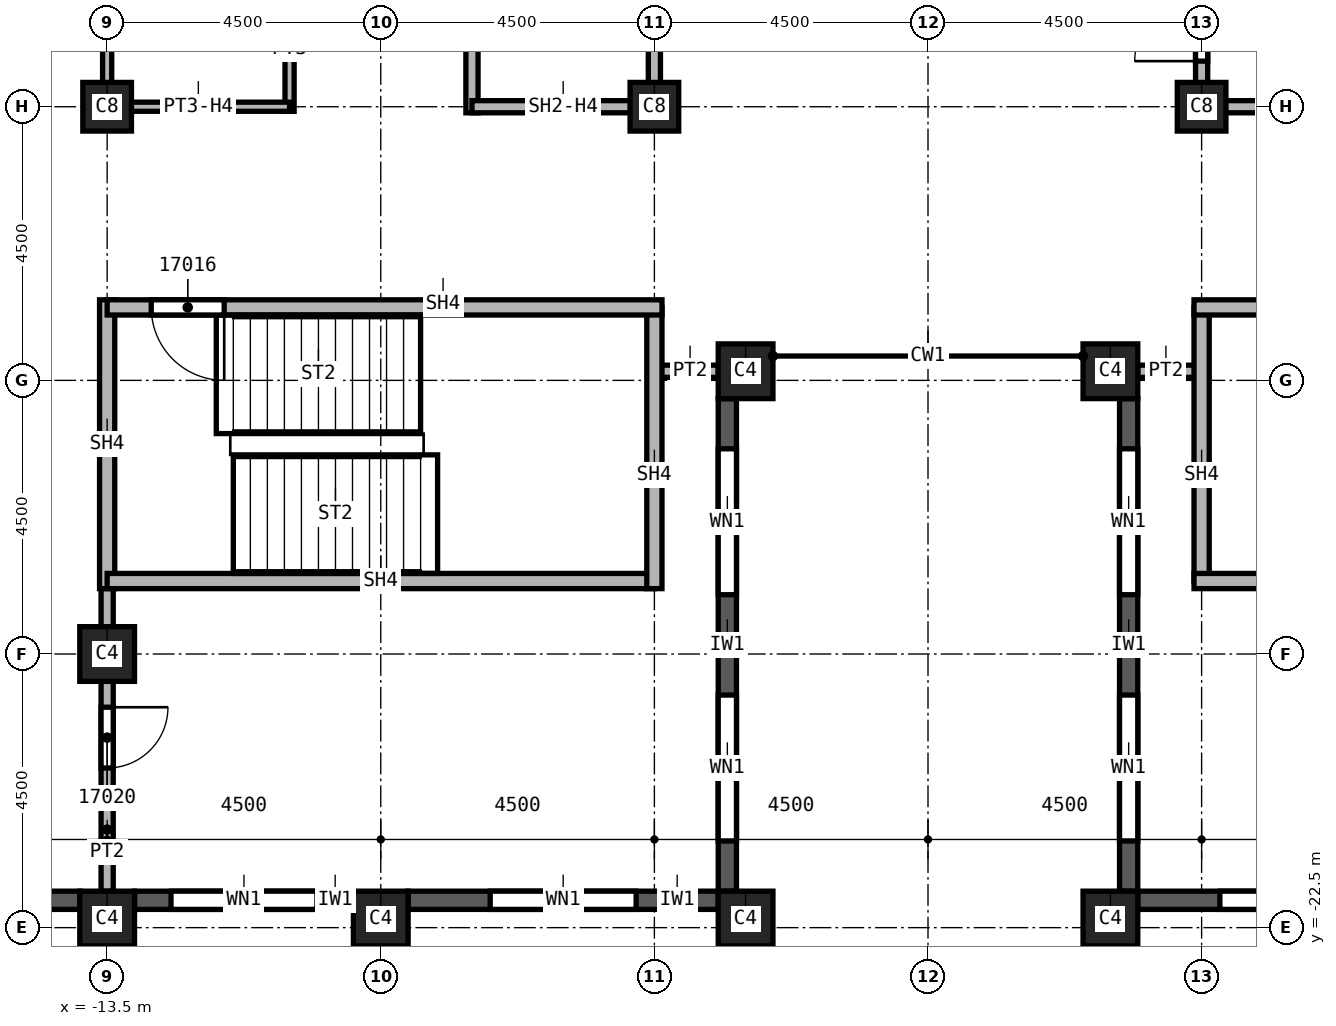
"""IFC4 building model, lengths in metres.
Left out: names, types, materials, properties, quantities, classifications, styles, units other than length and angle.
Written with IfcOpenShell. Run it as: python <this file> out.ifc"""

import sys

from ifc_helpers import new_model, si_unit, direction, frame, frame_2d, origin, origin_2d, place, context, subcontext, project, spatial, rectangle, extrude, element, fill, save


model = new_model("IFC4")
c1 = context("Model", 3, precision=1e-05, world=origin(), true_north=direction((0.0, 1.0)))
c2 = subcontext(c1, "Body", "Model", "MODEL_VIEW")
j1 = project(units=[si_unit("LENGTHUNIT", "METRE"), si_unit("PLANEANGLEUNIT", "RADIAN")], contexts=[c1])
p1 = place(None, origin())
s1 = spatial("IfcSite", under=j1, at=p1, CompositionType="ELEMENT")
p2 = place(p1, origin())
s2 = spatial("IfcBuilding", under=s1, at=p2, CompositionType="ELEMENT")
p3 = place(p2, frame((0.0, 0.0, 254.0)))
s3 = spatial("IfcBuildingStorey", under=s2, at=p3, CompositionType="ELEMENT", Elevation=254.0)
p4 = place(p3, frame((-13.5, -18.0, 0.0), z_axis=(0.0, 0.0, 1.0), x_axis=(1.0, 0.0, 0.0)))
e1 = element("IfcColumn", 1, at=p4, inside=s3, PredefinedType="COLUMN", context=c2, shape_type="SweptSolid", body=[
    extrude(rectangle(XDim=0.9, YDim=0.9, at=origin_2d()), origin(), (0.0, 0.0, 1.0), 3.72),
])
for number, where, z_axis, x_axis in (
    (2, (4.5, -9.0, 0.0), (0.0, 0.0, 1.0), (1.0, 0.0, 0.0)),
    (3, (-4.5, -9.0, 0.0), (0.0, 0.0, 1.0), (1.0, 0.0, 0.0)),
    (4, (-13.5, -9.0, 0.0), (0.0, 0.0, 1.0), (1.0, 0.0, 0.0)),
):
    element("IfcColumn", number, at=place(p3, frame(where, z_axis=z_axis, x_axis=x_axis)), inside=s3, PredefinedType="COLUMN", context=c2, shape_type="SweptSolid", body=[
        extrude(rectangle(XDim=0.8, YDim=0.8, at=origin_2d()), origin(), (0.0, 0.0, 1.0), 3.72),
    ])
for number, where, z_axis, x_axis in (
    (5, (3.0, -22.35, 0.0), (0.0, 0.0, 1.0), (1.0, 0.0, 0.0)),
    (6, (-3.0, -22.35, 0.0), (0.0, 0.0, 1.0), (1.0, 0.0, 0.0)),
    (7, (-9.0, -22.35, 0.0), (0.0, 0.0, 1.0), (1.0, 0.0, 0.0)),
    (8, (-13.5, -22.35, 0.0), (0.0, 0.0, 1.0), (1.0, 0.0, 0.0)),
    (9, (3.0, -13.35, 0.0), (0.0, 0.0, 1.0), (1.0, 0.0, 0.0)),
    (10, (-3.0, -13.35, 0.0), (0.0, 0.0, 1.0), (1.0, 0.0, 0.0)),
):
    element("IfcColumn", number, at=place(p3, frame(where, z_axis=z_axis, x_axis=x_axis)), inside=s3, PredefinedType="COLUMN", context=c2, shape_type="SweptSolid", body=[
        extrude(rectangle(XDim=0.9, YDim=0.9, at=origin_2d()), origin(), (0.0, 0.0, 1.0), 3.72),
    ])
p5 = place(p3, frame((-17.55, -22.05, 0.0), z_axis=(0.0, 0.0, 1.0), x_axis=(1.0, 0.0, 0.0)))
e11 = element("IfcWall", 11, at=p5, inside=s3, PredefinedType="SOLIDWALL", context=c2, shape_type="SweptSolid", body=[
    extrude(rectangle(XDim=3.6, YDim=0.3, at=frame_2d((1.8, 0.0))), origin(), (0.0, 0.0, 1.0), 3.12),
])
p6 = place(p5, frame((0.775, 0.0, 0.8)))
e12 = element("IfcOpeningElement", 12, at=p6, cuts=e11, PredefinedType="OPENING", context=c2, shape_type="SweptSolid", body=[
    extrude(rectangle(XDim=1.0, YDim=1.95, at=frame_2d((0.5, 0.975))), frame((0.0, 0.15, 0.0), z_axis=(0.0, -1.0, 0.0), x_axis=(1.0, 0.0, 0.0)), (0.0, 0.0, 1.0), 0.3),
])
p7 = place(p5, frame((2.375, 0.0, 0.8)))
e13 = element("IfcOpeningElement", 13, at=p7, cuts=e11, PredefinedType="OPENING", context=c2, shape_type="SweptSolid", body=[
    extrude(rectangle(XDim=0.6, YDim=1.95, at=frame_2d((0.3, 0.975))), frame((0.0, 0.15, 0.0), z_axis=(0.0, -1.0, 0.0), x_axis=(1.0, 0.0, 0.0)), (0.0, 0.0, 1.0), 0.3),
])
p8 = place(p3, frame((-13.05, -22.05, 0.0), z_axis=(0.0, 0.0, 1.0), x_axis=(1.0, 0.0, 0.0)))
e14 = element("IfcWall", 14, at=p8, inside=s3, PredefinedType="SOLIDWALL", context=c2, shape_type="SweptSolid", body=[
    extrude(rectangle(XDim=3.6, YDim=0.3, at=frame_2d((1.8, 0.0))), origin(), (0.0, 0.0, 1.0), 3.12),
])
p9 = place(p8, frame((0.6, 0.0, 0.8)))
e15 = element("IfcOpeningElement", 15, at=p9, cuts=e14, PredefinedType="OPENING", context=c2, shape_type="SweptSolid", body=[
    extrude(rectangle(XDim=2.4, YDim=1.95, at=frame_2d((1.2, 0.975))), frame((0.0, 0.15, 0.0), z_axis=(0.0, -1.0, 0.0), x_axis=(1.0, 0.0, 0.0)), (0.0, 0.0, 1.0), 0.3),
])
p10 = place(p3, frame((-8.55, -22.05, 0.0), z_axis=(0.0, 0.0, 1.0), x_axis=(1.0, 0.0, 0.0)))
e16 = element("IfcWall", 16, at=p10, inside=s3, PredefinedType="SOLIDWALL", context=c2, shape_type="SweptSolid", body=[
    extrude(rectangle(XDim=5.1, YDim=0.3, at=frame_2d((2.55, 0.0))), origin(), (0.0, 0.0, 1.0), 3.12),
])
p11 = place(p10, frame((1.35, 0.0, 0.8)))
e17 = element("IfcOpeningElement", 17, at=p11, cuts=e16, PredefinedType="OPENING", context=c2, shape_type="SweptSolid", body=[
    extrude(rectangle(XDim=2.4, YDim=1.95, at=frame_2d((1.2, 0.975))), frame((0.0, 0.15, 0.0), z_axis=(0.0, -1.0, 0.0), x_axis=(1.0, 0.0, 0.0)), (0.0, 0.0, 1.0), 0.3),
])
p12 = place(p3, frame((-3.3, -21.9, 0.0), z_axis=(0.0, 0.0, 1.0), x_axis=(0.0, 1.0, 0.0)))
e18 = element("IfcWall", 18, at=p12, inside=s3, PredefinedType="SOLIDWALL", context=c2, shape_type="SweptSolid", body=[
    extrude(rectangle(XDim=8.1, YDim=0.3, at=frame_2d((4.05, 0.0))), origin(), (0.0, 0.0, 1.0), 3.12),
])
p13 = place(p12, frame((0.825, 0.0, 0.8)))
e19 = element("IfcOpeningElement", 19, at=p13, cuts=e18, PredefinedType="OPENING", context=c2, shape_type="SweptSolid", body=[
    extrude(rectangle(XDim=2.4, YDim=1.95, at=frame_2d((1.2, 0.975))), frame((0.0, 0.15, 0.0), z_axis=(0.0, -1.0, 0.0), x_axis=(1.0, 0.0, 0.0)), (0.0, 0.0, 1.0), 0.3),
])
p14 = place(p12, frame((4.875, 0.0, 0.8)))
e20 = element("IfcOpeningElement", 20, at=p14, cuts=e18, PredefinedType="OPENING", context=c2, shape_type="SweptSolid", body=[
    extrude(rectangle(XDim=2.4, YDim=1.95, at=frame_2d((1.2, 0.975))), frame((0.0, 0.15, 0.0), z_axis=(0.0, -1.0, 0.0), x_axis=(1.0, 0.0, 0.0)), (0.0, 0.0, 1.0), 0.3),
])
p15 = place(p3, frame((3.3, -13.8, 0.0), z_axis=(0.0, 0.0, 1.0), x_axis=(0.0, -1.0, 0.0)))
e21 = element("IfcWall", 21, at=p15, inside=s3, PredefinedType="SOLIDWALL", context=c2, shape_type="SweptSolid", body=[
    extrude(rectangle(XDim=8.1, YDim=0.3, at=frame_2d((4.05, 0.0))), origin(), (0.0, 0.0, 1.0), 3.12),
])
p16 = place(p15, frame((0.825, 0.0, 0.8)))
e22 = element("IfcOpeningElement", 22, at=p16, cuts=e21, PredefinedType="OPENING", context=c2, shape_type="SweptSolid", body=[
    extrude(rectangle(XDim=2.4, YDim=1.95, at=frame_2d((1.2, 0.975))), frame((0.0, 0.15, 0.0), z_axis=(0.0, -1.0, 0.0), x_axis=(1.0, 0.0, 0.0)), (0.0, 0.0, 1.0), 0.3),
])
p17 = place(p15, frame((4.875, 0.0, 0.8)))
e23 = element("IfcOpeningElement", 23, at=p17, cuts=e21, PredefinedType="OPENING", context=c2, shape_type="SweptSolid", body=[
    extrude(rectangle(XDim=2.4, YDim=1.95, at=frame_2d((1.2, 0.975))), frame((0.0, 0.15, 0.0), z_axis=(0.0, -1.0, 0.0), x_axis=(1.0, 0.0, 0.0)), (0.0, 0.0, 1.0), 0.3),
])
p18 = place(p3, frame((3.45, -22.05, 0.0), z_axis=(0.0, 0.0, 1.0), x_axis=(1.0, 0.0, 0.0)))
e24 = element("IfcWall", 24, at=p18, inside=s3, PredefinedType="SOLIDWALL", context=c2, shape_type="SweptSolid", body=[
    extrude(rectangle(XDim=5.1, YDim=0.3, at=frame_2d((2.55, 0.0))), origin(), (0.0, 0.0, 1.0), 3.12),
])
p19 = place(p18, frame((1.35, 0.0, 0.8)))
e25 = element("IfcOpeningElement", 25, at=p19, cuts=e24, PredefinedType="OPENING", context=c2, shape_type="SweptSolid", body=[
    extrude(rectangle(XDim=2.4, YDim=1.95, at=frame_2d((1.2, 0.975))), frame((0.0, 0.15, 0.0), z_axis=(0.0, -1.0, 0.0), x_axis=(1.0, 0.0, 0.0)), (0.0, 0.0, 1.0), 0.3),
])
p20 = place(p3, frame((-13.5, -16.675, 0.0), z_axis=(0.0, 0.0, 1.0), x_axis=(0.0, -1.0, 0.0)))
e26 = element("IfcWall", 26, at=p20, inside=s3, PredefinedType="PARTITIONING", context=c2, shape_type="SweptSolid", body=[
    extrude(rectangle(XDim=5.225, YDim=0.2, at=frame_2d((2.612, 0.0))), origin(), (0.0, 0.0, 1.0), 3.72),
])
p21 = place(p20, frame((2.2, 0.0, 0.0)))
e27 = element("IfcOpeningElement", 27, at=p21, cuts=e26, PredefinedType="OPENING", context=c2, shape_type="SweptSolid", body=[
    extrude(rectangle(XDim=1.0, YDim=2.1, at=frame_2d((0.5, 1.05))), frame((0.0, 0.1, 0.0), z_axis=(0.0, -1.0, 0.0), x_axis=(1.0, 0.0, 0.0)), (0.0, 0.0, 1.0), 0.2),
])
for number, where, z_axis, x_axis in (
    (28, (-3.45, -13.35, 0.0), (0.0, 0.0, 1.0), (-1.0, 0.0, 0.0)),
    (29, (4.5, -13.35, 0.0), (0.0, 0.0, 1.0), (-1.0, 0.0, 0.0)),
):
    element("IfcWall", number, at=place(p3, frame(where, z_axis=z_axis, x_axis=x_axis)), inside=s3, PredefinedType="PARTITIONING", context=c2, shape_type="SweptSolid", body=[
        extrude(rectangle(XDim=1.05, YDim=0.2, at=frame_2d((0.525, 0.0))), origin(), (0.0, 0.0, 1.0), 3.72),
    ])
p22 = place(p3, frame((-7.5, -9.1, 0.0), z_axis=(0.0, 0.0, 1.0), x_axis=(0.0, 1.0, 0.0)))
e30 = element("IfcWall", 30, at=p22, inside=s3, PredefinedType="SOLIDWALL", context=c2, shape_type="SweptSolid", body=[
    extrude(rectangle(XDim=6.225, YDim=0.2, at=frame_2d((3.113, 0.0))), origin(), (0.0, 0.0, 1.0), 3.72),
])
p23 = place(p3, frame((-4.5, -9.0, 0.0), z_axis=(0.0, 0.0, 1.0), x_axis=(-1.0, 0.0, 0.0)))
e31 = element("IfcWall", 31, at=p23, inside=s3, PredefinedType="SOLIDWALL", context=c2, shape_type="SweptSolid", body=[
    extrude(rectangle(XDim=3.0, YDim=0.2, at=frame_2d((1.5, 0.0))), origin(), (0.0, 0.0, 1.0), 3.042),
])
p24 = place(p3, frame((-4.5, 0.0, 0.0), z_axis=(0.0, 0.0, 1.0), x_axis=(0.0, -1.0, 0.0)))
e32 = element("IfcWall", 32, at=p24, inside=s3, PredefinedType="SOLIDWALL", context=c2, shape_type="SweptSolid", body=[
    extrude(rectangle(XDim=9.1, YDim=0.2, at=frame_2d((4.55, 0.0))), origin(), (0.0, 0.0, 1.0), 3.042),
])
p25 = place(p24, frame((1.3, 0.0, 0.0)))
e33 = element("IfcOpeningElement", 33, at=p25, cuts=e32, PredefinedType="OPENING", context=c2, shape_type="SweptSolid", body=[
    extrude(rectangle(XDim=1.1, YDim=2.1, at=frame_2d((0.55, 1.05))), frame((0.0, 0.1, 0.0), z_axis=(0.0, -1.0, 0.0), x_axis=(1.0, 0.0, 0.0)), (0.0, 0.0, 1.0), 0.2),
])
p26 = place(p3, frame((4.5, -9.1, 0.0), z_axis=(0.0, 0.0, 1.0), x_axis=(0.0, 1.0, 0.0)))
e34 = element("IfcWall", 34, at=p26, inside=s3, PredefinedType="SOLIDWALL", context=c2, shape_type="SweptSolid", body=[
    extrude(rectangle(XDim=3.1, YDim=0.2, at=frame_2d((1.55, 0.0))), origin(), (0.0, 0.0, 1.0), 3.042),
])
p27 = place(p26, frame((0.85, 0.0, 0.0)))
e35 = element("IfcOpeningElement", 35, at=p27, cuts=e34, PredefinedType="OPENING", context=c2, shape_type="SweptSolid", body=[
    extrude(rectangle(XDim=1.1, YDim=2.1, at=frame_2d((0.55, 1.05))), frame((0.0, 0.1, 0.0), z_axis=(0.0, -1.0, 0.0), x_axis=(1.0, 0.0, 0.0)), (0.0, 0.0, 1.0), 0.2),
])
p28 = place(p3, frame((7.5, -9.0, 0.0), z_axis=(0.0, 0.0, 1.0), x_axis=(-1.0, 0.0, 0.0)))
e36 = element("IfcWall", 36, at=p28, inside=s3, PredefinedType="SOLIDWALL", context=c2, shape_type="SweptSolid", body=[
    extrude(rectangle(XDim=3.0, YDim=0.2, at=frame_2d((1.5, 0.0))), origin(), (0.0, 0.0, 1.0), 3.042),
])
p29 = place(p3, frame((-13.5, -12.175, 0.0), z_axis=(0.0, 0.0, 1.0), x_axis=(0.0, -1.0, 0.0)))
e37 = element("IfcWall", 37, at=p29, inside=s3, PredefinedType="SOLIDWALL", context=c2, shape_type="SweptSolid", body=[
    extrude(rectangle(XDim=4.75, YDim=0.25, at=frame_2d((2.375, 0.0))), origin(), (0.0, 0.0, 1.0), 3.72),
])
p30 = place(p3, frame((-4.5, -16.8, 0.0), z_axis=(0.0, 0.0, 1.0), x_axis=(-1.0, 0.0, 0.0)))
e38 = element("IfcWall", 38, at=p30, inside=s3, PredefinedType="SOLIDWALL", context=c2, shape_type="SweptSolid", body=[
    extrude(rectangle(XDim=9.0, YDim=0.25, at=frame_2d((4.5, 0.0))), origin(), (0.0, 0.0, 1.0), 3.72),
])
p31 = place(p3, frame((-4.5, -12.3, 0.0), z_axis=(0.0, 0.0, 1.0), x_axis=(0.0, -1.0, 0.0)))
e39 = element("IfcWall", 39, at=p31, inside=s3, PredefinedType="SOLIDWALL", context=c2, shape_type="SweptSolid", body=[
    extrude(rectangle(XDim=4.625, YDim=0.25, at=frame_2d((2.312, 0.0))), origin(), (0.0, 0.0, 1.0), 3.72),
])
p32 = place(p3, frame((-4.375, -12.3, 0.0), z_axis=(0.0, 0.0, 1.0), x_axis=(-1.0, 0.0, 0.0)))
e40 = element("IfcWall", 40, at=p32, inside=s3, PredefinedType="SOLIDWALL", context=c2, shape_type="SweptSolid", body=[
    extrude(rectangle(XDim=9.125, YDim=0.25, at=frame_2d((4.562, 0.0))), origin(), (0.0, 0.0, 1.0), 3.72),
])
p33 = place(p32, frame((7.2, 0.0, 0.0)))
e41 = element("IfcOpeningElement", 41, at=p33, cuts=e40, PredefinedType="OPENING", context=c2, shape_type="SweptSolid", body=[
    extrude(rectangle(XDim=1.2, YDim=2.1, at=frame_2d((0.6, 1.05))), frame((0.0, 0.125, 0.0), z_axis=(0.0, -1.0, 0.0), x_axis=(1.0, 0.0, 0.0)), (0.0, 0.0, 1.0), 0.25),
])
p34 = place(p3, frame((4.5, -16.8, 0.0), z_axis=(0.0, 0.0, 1.0), x_axis=(0.0, 1.0, 0.0)))
e42 = element("IfcWall", 42, at=p34, inside=s3, PredefinedType="SOLIDWALL", context=c2, shape_type="SweptSolid", body=[
    extrude(rectangle(XDim=4.5, YDim=0.25, at=frame_2d((2.25, 0.0))), origin(), (0.0, 0.0, 1.0), 3.72),
])
p35 = place(p3, frame((13.5, -16.8, 0.0), z_axis=(0.0, 0.0, 1.0), x_axis=(-1.0, 0.0, 0.0)))
e43 = element("IfcWall", 43, at=p35, inside=s3, PredefinedType="SOLIDWALL", context=c2, shape_type="SweptSolid", body=[
    extrude(rectangle(XDim=9.125, YDim=0.25, at=frame_2d((4.562, 0.0))), origin(), (0.0, 0.0, 1.0), 3.72),
])
p36 = place(p3, frame((13.5, -12.3, 0.0), z_axis=(0.0, 0.0, 1.0), x_axis=(-1.0, 0.0, 0.0)))
e44 = element("IfcWall", 44, at=p36, inside=s3, PredefinedType="SOLIDWALL", context=c2, shape_type="SweptSolid", body=[
    extrude(rectangle(XDim=9.125, YDim=0.25, at=frame_2d((4.562, 0.0))), origin(), (0.0, 0.0, 1.0), 3.72),
])
p37 = place(p36, frame((0.6, 0.0, 0.0)))
e45 = element("IfcOpeningElement", 45, at=p37, cuts=e44, PredefinedType="OPENING", context=c2, shape_type="SweptSolid", body=[
    extrude(rectangle(XDim=1.2, YDim=2.1, at=frame_2d((0.6, 1.05))), frame((0.0, 0.125, 0.0), z_axis=(0.0, -1.0, 0.0), x_axis=(1.0, 0.0, 0.0)), (0.0, 0.0, 1.0), 0.25),
])
p38 = place(p3, frame((-13.5, -9.075, 0.0), z_axis=(0.0, 0.0, 1.0), x_axis=(0.0, 1.0, 0.0)))
e46 = element("IfcWall", 46, at=p38, inside=s3, PredefinedType="PARTITIONING", context=c2, shape_type="SweptSolid", body=[
    extrude(rectangle(XDim=3.075, YDim=0.15, at=frame_2d((1.538, 0.0))), origin(), (0.0, 0.0, 1.0), 3.042),
])
p39 = place(p3, frame((-10.5, -9.075, 0.0), z_axis=(0.0, 0.0, 1.0), x_axis=(0.0, 1.0, 0.0)))
e47 = element("IfcWall", 47, at=p39, inside=s3, PredefinedType="PARTITIONING", context=c2, shape_type="SweptSolid", body=[
    extrude(rectangle(XDim=3.15, YDim=0.15, at=frame_2d((1.575, 0.0))), origin(), (0.0, 0.0, 1.0), 3.72),
])
p40 = place(p39, frame((1.9, 0.0, 0.0)))
e48 = element("IfcOpeningElement", 48, at=p40, cuts=e47, PredefinedType="OPENING", context=c2, shape_type="SweptSolid", body=[
    extrude(rectangle(XDim=0.9, YDim=2.1, at=frame_2d((0.45, 1.05))), frame((0.0, 0.075, 0.0), z_axis=(0.0, -1.0, 0.0), x_axis=(1.0, 0.0, 0.0)), (0.0, 0.0, 1.0), 0.15),
])
p41 = place(p3, frame((-10.5, -9.0, 0.0), z_axis=(0.0, 0.0, 1.0), x_axis=(-1.0, 0.0, 0.0)))
e49 = element("IfcWall", 49, at=p41, inside=s3, PredefinedType="PARTITIONING", context=c2, shape_type="SweptSolid", body=[
    extrude(rectangle(XDim=3.0, YDim=0.15, at=frame_2d((1.5, 0.0))), origin(), (0.0, 0.0, 1.0), 3.042),
])
p42 = place(p9, origin())
e50 = element("IfcWindow", 50, at=p42, inside=s3, PartitioningType="SINGLE_PANEL", PredefinedType="WINDOW", context=c2, shape_type="SweptSolid", body=[
    extrude(rectangle(XDim=2.4, YDim=1.95, at=frame_2d((1.2, 0.975))), frame((0.0, 0.03, 0.0), z_axis=(0.0, -1.0, 0.0), x_axis=(1.0, 0.0, 0.0)), (0.0, 0.0, 1.0), 0.06),
])
fill(e15, e50)
p43 = place(p11, origin())
e51 = element("IfcWindow", 51, at=p43, inside=s3, PartitioningType="SINGLE_PANEL", PredefinedType="WINDOW", context=c2, shape_type="SweptSolid", body=[
    extrude(rectangle(XDim=2.4, YDim=1.95, at=frame_2d((1.2, 0.975))), frame((0.0, 0.03, 0.0), z_axis=(0.0, -1.0, 0.0), x_axis=(1.0, 0.0, 0.0)), (0.0, 0.0, 1.0), 0.06),
])
fill(e17, e51)
p44 = place(p13, origin())
e52 = element("IfcWindow", 52, at=p44, inside=s3, PartitioningType="SINGLE_PANEL", PredefinedType="WINDOW", context=c2, shape_type="SweptSolid", body=[
    extrude(rectangle(XDim=2.4, YDim=1.95, at=frame_2d((1.2, 0.975))), frame((0.0, 0.03, 0.0), z_axis=(0.0, -1.0, 0.0), x_axis=(1.0, 0.0, 0.0)), (0.0, 0.0, 1.0), 0.06),
])
fill(e19, e52)
p45 = place(p14, origin())
e53 = element("IfcWindow", 53, at=p45, inside=s3, PartitioningType="SINGLE_PANEL", PredefinedType="WINDOW", context=c2, shape_type="SweptSolid", body=[
    extrude(rectangle(XDim=2.4, YDim=1.95, at=frame_2d((1.2, 0.975))), frame((0.0, 0.03, 0.0), z_axis=(0.0, -1.0, 0.0), x_axis=(1.0, 0.0, 0.0)), (0.0, 0.0, 1.0), 0.06),
])
fill(e20, e53)
p46 = place(p16, origin())
e54 = element("IfcWindow", 54, at=p46, inside=s3, PartitioningType="SINGLE_PANEL", PredefinedType="WINDOW", context=c2, shape_type="SweptSolid", body=[
    extrude(rectangle(XDim=2.4, YDim=1.95, at=frame_2d((1.2, 0.975))), frame((0.0, 0.03, 0.0), z_axis=(0.0, -1.0, 0.0), x_axis=(1.0, 0.0, 0.0)), (0.0, 0.0, 1.0), 0.06),
])
fill(e22, e54)
p47 = place(p17, origin())
e55 = element("IfcWindow", 55, at=p47, inside=s3, PartitioningType="SINGLE_PANEL", PredefinedType="WINDOW", context=c2, shape_type="SweptSolid", body=[
    extrude(rectangle(XDim=2.4, YDim=1.95, at=frame_2d((1.2, 0.975))), frame((0.0, 0.03, 0.0), z_axis=(0.0, -1.0, 0.0), x_axis=(1.0, 0.0, 0.0)), (0.0, 0.0, 1.0), 0.06),
])
fill(e23, e55)
p48 = place(p19, origin())
e56 = element("IfcWindow", 56, at=p48, inside=s3, PartitioningType="SINGLE_PANEL", PredefinedType="WINDOW", context=c2, shape_type="SweptSolid", body=[
    extrude(rectangle(XDim=2.4, YDim=1.95, at=frame_2d((1.2, 0.975))), frame((0.0, 0.03, 0.0), z_axis=(0.0, -1.0, 0.0), x_axis=(1.0, 0.0, 0.0)), (0.0, 0.0, 1.0), 0.06),
])
fill(e25, e56)
p49 = place(p27, origin())
e57 = element("IfcDoor", 57, at=p49, inside=s3, OperationType="SINGLE_SWING_RIGHT", PredefinedType="DOOR", context=c2, shape_type="SweptSolid", body=[
    extrude(rectangle(XDim=1.1, YDim=2.1, at=frame_2d((0.55, 1.05))), frame((0.0, 0.025, 0.0), z_axis=(0.0, -1.0, 0.0), x_axis=(1.0, 0.0, 0.0)), (0.0, 0.0, 1.0), 0.05),
])
fill(e35, e57)
p50 = place(p33, origin())
e58 = element("IfcDoor", 58, at=p50, inside=s3, OperationType="SINGLE_SWING_LEFT", PredefinedType="DOOR", context=c2, shape_type="SweptSolid", body=[
    extrude(rectangle(XDim=1.2, YDim=2.1, at=frame_2d((0.6, 1.05))), frame((0.0, 0.025, 0.0), z_axis=(0.0, -1.0, 0.0), x_axis=(1.0, 0.0, 0.0)), (0.0, 0.0, 1.0), 0.05),
])
fill(e41, e58)
p51 = place(p21, origin())
e59 = element("IfcDoor", 59, at=p51, inside=s3, OperationType="SINGLE_SWING_LEFT", PredefinedType="DOOR", context=c2, shape_type="SweptSolid", body=[
    extrude(rectangle(XDim=1.0, YDim=2.1, at=frame_2d((0.5, 1.05))), frame((0.0, 0.025, 0.0), z_axis=(0.0, -1.0, 0.0), x_axis=(1.0, 0.0, 0.0)), (0.0, 0.0, 1.0), 0.05),
])
fill(e27, e59)
save(model, sys.argv[1])
